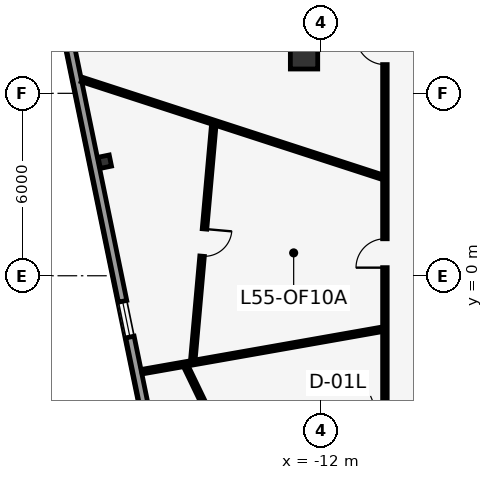
"""IFC4 building model, lengths in metres.
Left out: names, types, materials, properties, quantities, classifications, styles, units other than length and angle.
Written with IfcOpenShell. Run it as: python <this file> out.ifc"""

import sys

from ifc_helpers import new_model, si_unit, direction, frame, frame_2d, origin, origin_2d, place, context, subcontext, project, spatial, rectangle, i_section, extrude, element, fill, save


model = new_model("IFC4")
c1 = context("Model", 3, precision=1e-05, world=origin(), true_north=direction((0.0, 1.0)))
c2 = subcontext(c1, "Body", "Model", "MODEL_VIEW")
j1 = project(units=[si_unit("LENGTHUNIT", "METRE"), si_unit("PLANEANGLEUNIT", "RADIAN")], contexts=[c1])
p1 = place(None, origin())
s1 = spatial("IfcSite", under=j1, at=p1, CompositionType="ELEMENT")
p2 = place(p1, origin())
s2 = spatial("IfcBuilding", under=s1, at=p2, CompositionType="ELEMENT")
p3 = place(p2, frame((0.0, 0.0, 236.3)))
s3 = spatial("IfcBuildingStorey", under=s2, at=p3, CompositionType="ELEMENT", Elevation=236.3)
p4 = place(p3, frame((-12.56, 7.25, 0.0), z_axis=(0.0, 0.0, 1.0), x_axis=(1.0, 0.0, 0.0)))
e1 = element("IfcColumn", 1, at=p4, inside=s3, PredefinedType="COLUMN", context=c2, shape_type="SweptSolid", body=[
    extrude(rectangle(XDim=0.9, YDim=0.9, at=origin_2d()), origin(), (0.0, 0.0, 1.0), 4.1),
])
p5 = place(p3, frame((-19.113, 3.751, 0.0), z_axis=(0.0, 0.0, 1.0), x_axis=(-0.201248886216, 0.979540139962, 0.0)))
e2 = element("IfcColumn", 2, at=p5, inside=s3, PredefinedType="COLUMN", context=c2, shape_type="SweptSolid", body=[
    extrude(i_section(OverallWidth=0.373, OverallDepth=0.373, WebThickness=0.016, FlangeThickness=0.026, at=origin_2d()), origin(), (0.0, 0.0, 1.0), 4.1),
])
p6 = place(p3, frame((-12.893, -28.239, 0.0), z_axis=(0.0, 0.0, 1.0), x_axis=(-0.201426823496, 0.979503565474, 0.0)))
e3 = element("IfcWall", 3, at=p6, inside=s3, PredefinedType="STANDARD", context=c2, shape_type="SweptSolid", body=[
    extrude(rectangle(XDim=49.145, YDim=0.28, at=frame_2d((24.573, 0.0))), origin(), (0.0, 0.0, 1.0), 3.85),
])
p7 = place(p6, frame((4.373, 0.0, 0.85)))
e4 = element("IfcOpeningElement", 4, at=p7, cuts=e3, PredefinedType="OPENING", context=c2, shape_type="SweptSolid", body=[
    extrude(rectangle(XDim=1.2, YDim=2.2, at=frame_2d((0.6, 1.1))), frame((0.0, 0.15, 0.0), z_axis=(0.0, -1.0, 0.0), x_axis=(1.0, 0.0, 0.0)), (0.0, 0.0, 1.0), 0.3),
])
p8 = place(p6, frame((9.973, 0.0, 0.85)))
e5 = element("IfcOpeningElement", 5, at=p8, cuts=e3, PredefinedType="OPENING", context=c2, shape_type="SweptSolid", body=[
    extrude(rectangle(XDim=1.2, YDim=2.2, at=frame_2d((0.6, 1.1))), frame((0.0, 0.15, 0.0), z_axis=(0.0, -1.0, 0.0), x_axis=(1.0, 0.0, 0.0)), (0.0, 0.0, 1.0), 0.3),
])
p9 = place(p6, frame((21.173, 0.0, 0.85)))
e6 = element("IfcOpeningElement", 6, at=p9, cuts=e3, PredefinedType="OPENING", context=c2, shape_type="SweptSolid", body=[
    extrude(rectangle(XDim=1.2, YDim=2.2, at=frame_2d((0.6, 1.1))), frame((0.0, 0.15, 0.0), z_axis=(0.0, -1.0, 0.0), x_axis=(1.0, 0.0, 0.0)), (0.0, 0.0, 1.0), 0.3),
])
p10 = place(p6, frame((26.773, 0.0, 0.85)))
e7 = element("IfcOpeningElement", 7, at=p10, cuts=e3, PredefinedType="OPENING", context=c2, shape_type="SweptSolid", body=[
    extrude(rectangle(XDim=1.2, YDim=2.2, at=frame_2d((0.6, 1.1))), frame((0.0, 0.15, 0.0), z_axis=(0.0, -1.0, 0.0), x_axis=(1.0, 0.0, 0.0)), (0.0, 0.0, 1.0), 0.3),
])
p11 = place(p6, frame((37.973, 0.0, 0.85)))
e8 = element("IfcOpeningElement", 8, at=p11, cuts=e3, PredefinedType="OPENING", context=c2, shape_type="SweptSolid", body=[
    extrude(rectangle(XDim=1.2, YDim=2.2, at=frame_2d((0.6, 1.1))), frame((0.0, 0.15, 0.0), z_axis=(0.0, -1.0, 0.0), x_axis=(1.0, 0.0, 0.0)), (0.0, 0.0, 1.0), 0.3),
])
p12 = place(p6, frame((43.573, 0.0, 0.85)))
e9 = element("IfcOpeningElement", 9, at=p12, cuts=e3, PredefinedType="OPENING", context=c2, shape_type="SweptSolid", body=[
    extrude(rectangle(XDim=1.2, YDim=2.2, at=frame_2d((0.6, 1.1))), frame((0.0, 0.15, 0.0), z_axis=(0.0, -1.0, 0.0), x_axis=(1.0, 0.0, 0.0)), (0.0, 0.0, 1.0), 0.3),
])
p13 = place(p3, frame((-9.9, -11.7, 0.0), z_axis=(0.0, 0.0, 1.0), x_axis=(0.0, 1.0, 0.0)))
e10 = element("IfcWall", 10, at=p13, inside=s3, PredefinedType="PARTITIONING", context=c2, shape_type="SweptSolid", body=[
    extrude(rectangle(XDim=23.55, YDim=0.15, at=frame_2d((11.775, 0.0))), origin(), (0.0, 0.0, 1.0), 3.85),
])
p14 = place(p13, frame((6.145, 0.0, 0.0)))
e11 = element("IfcOpeningElement", 11, at=p14, cuts=e10, PredefinedType="OPENING", context=c2, shape_type="SweptSolid", body=[
    extrude(rectangle(XDim=0.95, YDim=2.15, at=frame_2d((0.475, 1.075))), frame((0.0, 0.085, 0.0), z_axis=(0.0, -1.0, 0.0), x_axis=(1.0, 0.0, 0.0)), (0.0, 0.0, 1.0), 0.17),
])
p15 = place(p13, frame((18.645, 0.0, 0.0)))
e12 = element("IfcOpeningElement", 12, at=p15, cuts=e10, PredefinedType="OPENING", context=c2, shape_type="SweptSolid", body=[
    extrude(rectangle(XDim=0.95, YDim=2.15, at=frame_2d((0.475, 1.075))), frame((0.0, 0.085, 0.0), z_axis=(0.0, -1.0, 0.0), x_axis=(1.0, 0.0, 0.0)), (0.0, 0.0, 1.0), 0.17),
])
p16 = place(p13, frame((11.967, 0.0, 0.0)))
e13 = element("IfcOpeningElement", 13, at=p16, cuts=e10, PredefinedType="OPENING", context=c2, shape_type="SweptSolid", body=[
    extrude(rectangle(XDim=0.95, YDim=2.15, at=frame_2d((0.475, 1.075))), frame((0.0, 0.085, 0.0), z_axis=(0.0, -1.0, 0.0), x_axis=(1.0, 0.0, 0.0)), (0.0, 0.0, 1.0), 0.17),
])
p17 = place(p3, frame((-10.005, 3.251, 0.0), z_axis=(0.0, 0.0, 1.0), x_axis=(-0.951056724961, 0.309016352167, 0.0)))
e14 = element("IfcWall", 14, at=p17, inside=s3, PredefinedType="PARTITIONING", context=c2, shape_type="SweptSolid", body=[
    extrude(rectangle(XDim=10.373, YDim=0.15, at=frame_2d((5.186, 0.0))), origin(), (0.0, 0.0, 1.0), 3.85),
])
p18 = place(p3, frame((-10.005, -1.764, 0.0), z_axis=(0.0, 0.0, 1.0), x_axis=(-0.984809322237, -0.173639277917, 0.0)))
e15 = element("IfcWall", 15, at=p18, inside=s3, PredefinedType="PARTITIONING", context=c2, shape_type="SweptSolid", body=[
    extrude(rectangle(XDim=8.01, YDim=0.15, at=frame_2d((4.005, 0.0))), origin(), (0.0, 0.0, 1.0), 3.85),
])
p19 = place(p3, frame((-16.471, -2.93, 0.0), z_axis=(0.0, 0.0, 1.0), x_axis=(0.434035401787, -0.900895815283, 0.0)))
e16 = element("IfcWall", 16, at=p19, inside=s3, PredefinedType="PARTITIONING", context=c2, shape_type="SweptSolid", body=[
    extrude(rectangle(XDim=8.583, YDim=0.15, at=frame_2d((4.292, 0.0))), origin(), (0.0, 0.0, 1.0), 3.85),
])
p20 = place(p19, frame((3.816, 0.0, 0.0)))
e17 = element("IfcOpeningElement", 17, at=p20, cuts=e16, PredefinedType="OPENING", context=c2, shape_type="SweptSolid", body=[
    extrude(rectangle(XDim=0.95, YDim=2.15, at=frame_2d((0.475, 1.075))), frame((0.0, 0.085, 0.0), z_axis=(0.0, -1.0, 0.0), x_axis=(1.0, 0.0, 0.0)), (0.0, 0.0, 1.0), 0.17),
])
p21 = place(p3, frame((-15.524, 5.018, 0.0), z_axis=(0.0, 0.0, 1.0), x_axis=(-0.088751444217, -0.996053804345, 0.0)))
e18 = element("IfcWall", 18, at=p21, inside=s3, PredefinedType="PARTITIONING", context=c2, shape_type="SweptSolid", body=[
    extrude(rectangle(XDim=7.884, YDim=0.15, at=frame_2d((3.942, 0.0))), origin(), (0.0, 0.0, 1.0), 3.415),
])
p22 = place(p21, frame((3.492, 0.0, 0.0)))
e19 = element("IfcOpeningElement", 19, at=p22, cuts=e18, PredefinedType="OPENING", context=c2, shape_type="SweptSolid", body=[
    extrude(rectangle(XDim=0.9, YDim=2.1, at=frame_2d((0.45, 1.05))), frame((0.0, 0.085, 0.0), z_axis=(0.0, -1.0, 0.0), x_axis=(1.0, 0.0, 0.0)), (0.0, 0.0, 1.0), 0.17),
])
p23 = place(p10, origin())
e20 = element("IfcWindow", 20, at=p23, inside=s3, PartitioningType="SINGLE_PANEL", PredefinedType="WINDOW", context=c2, shape_type="SweptSolid", body=[
    extrude(rectangle(XDim=1.2, YDim=2.2, at=frame_2d((0.6, 1.1))), frame((0.0, 0.03, 0.0), z_axis=(0.0, -1.0, 0.0), x_axis=(1.0, 0.0, 0.0)), (0.0, 0.0, 1.0), 0.06),
])
fill(e7, e20)
p24 = place(p22, origin())
e21 = element("IfcDoor", 21, at=p24, inside=s3, OperationType="SINGLE_SWING_LEFT", PredefinedType="DOOR", context=c2, shape_type="SweptSolid", body=[
    extrude(rectangle(XDim=0.9, YDim=2.1, at=frame_2d((0.45, 1.05))), frame((0.0, 0.025, 0.0), z_axis=(0.0, -1.0, 0.0), x_axis=(1.0, 0.0, 0.0)), (0.0, 0.0, 1.0), 0.05),
])
fill(e19, e21)
p25 = place(p15, origin())
e22 = element("IfcDoor", 22, at=p25, inside=s3, OperationType="SINGLE_SWING_RIGHT", PredefinedType="DOOR", context=c2, shape_type="SweptSolid", body=[
    extrude(rectangle(XDim=0.95, YDim=2.15, at=frame_2d((0.475, 1.075))), frame((0.0, 0.025, 0.0), z_axis=(0.0, -1.0, 0.0), x_axis=(1.0, 0.0, 0.0)), (0.0, 0.0, 1.0), 0.05),
])
fill(e12, e22)
p26 = place(p16, origin())
e23 = element("IfcDoor", 23, at=p26, inside=s3, OperationType="SINGLE_SWING_LEFT", PredefinedType="DOOR", context=c2, shape_type="SweptSolid", body=[
    extrude(rectangle(XDim=0.95, YDim=2.15, at=frame_2d((0.475, 1.075))), frame((0.0, 0.025, 0.0), z_axis=(0.0, -1.0, 0.0), x_axis=(1.0, 0.0, 0.0)), (0.0, 0.0, 1.0), 0.05),
])
fill(e13, e23)
save(model, sys.argv[1])
